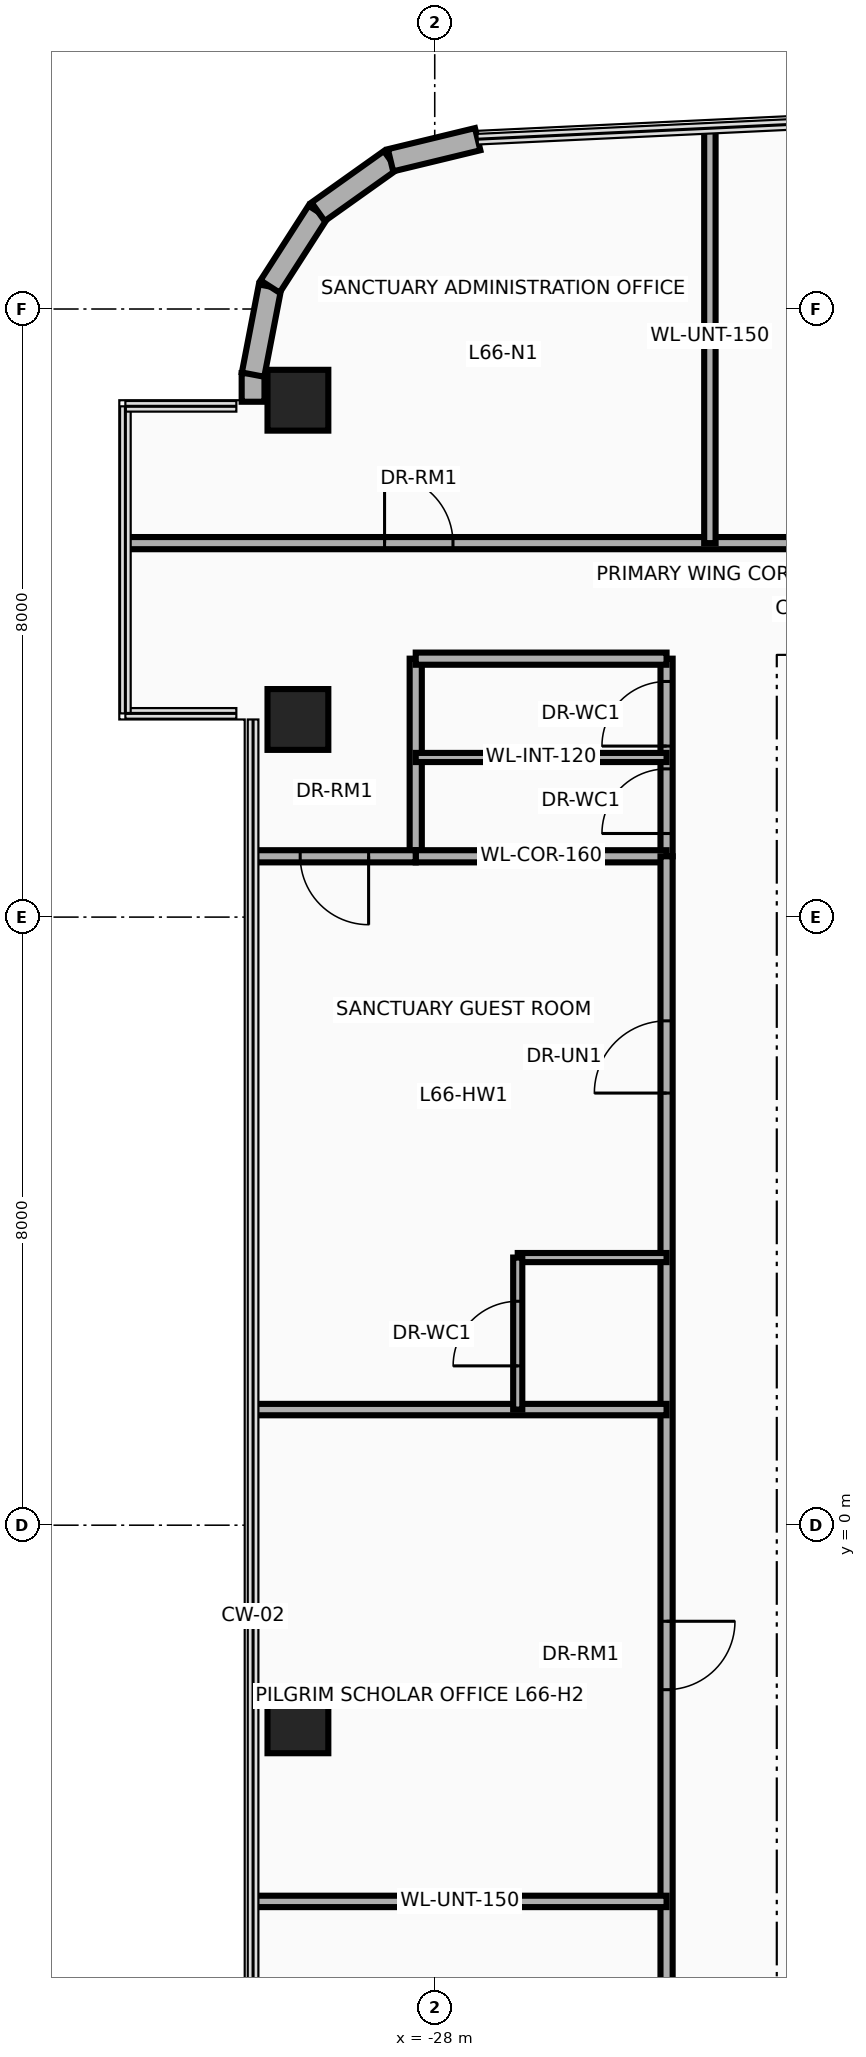
"""IFC4 building model, lengths in metres.
Left out: names, types, materials, properties, quantities, classifications, styles, units other than length and angle.
Written with IfcOpenShell. Run it as: python <this file> out.ifc"""

import sys

from ifc_helpers import new_model, si_unit, direction, frame, frame_2d, origin, origin_2d, place, context, subcontext, project, spatial, rectangle, extrude, source, transform, mapped, element, fill, save


model = new_model("IFC4")
c1 = context("Model", 3, precision=1e-05, world=origin(), true_north=direction((0.0, 1.0)))
c2 = subcontext(c1, "Body", "Model", "MODEL_VIEW")
j1 = project(units=[si_unit("LENGTHUNIT", "METRE"), si_unit("PLANEANGLEUNIT", "RADIAN")], contexts=[c1])
p1 = place(None, origin())
s1 = spatial("IfcSite", under=j1, at=p1, CompositionType="ELEMENT")
p2 = place(p1, origin())
s2 = spatial("IfcBuilding", under=s1, at=p2, CompositionType="ELEMENT")
p3 = place(p2, frame((0.0, 0.0, 254.5)))
s3 = spatial("IfcBuildingStorey", under=s2, at=p3, CompositionType="ELEMENT", Elevation=254.5)
m1 = source(origin(), c2, "Body", "SweptSolid", [
    extrude(rectangle(XDim=0.8, YDim=0.8, at=origin_2d()), origin(), (0.0, 0.0, 1.0), 3.5),
])
for number, where, z_axis, x_axis in (
    (1, (-29.8, -2.6, 0.0), (0.0, 0.0, 1.0), (1.0, 0.0, 0.0)),
    (2, (-29.8, 10.6, 0.0), (0.0, 0.0, 1.0), (1.0, 0.0, 0.0)),
    (3, (-29.8, 14.8, 0.0), (0.0, 0.0, 1.0), (1.0, 0.0, 0.0)),
):
    element("IfcColumn", number, at=place(p3, frame(where, z_axis=z_axis, x_axis=x_axis)), inside=s3, PredefinedType="COLUMN", context=c2, shape_type="MappedRepresentation", body=[
        mapped(m1, transform((0.0, 0.0, 0.0), x_axis=(1.0, 0.0, 0.0), y_axis=(0.0, 1.0, 0.0), z_axis=(0.0, 0.0, 1.0), scale=1.0)),
    ])
p4 = place(p3, frame((-30.39, 14.78, 0.0), z_axis=(0.0, 0.0, 1.0), x_axis=(0.0, 1.0, 0.0)))
e4 = element("IfcWall", 4, at=p4, inside=s3, PredefinedType="SOLIDWALL", context=c2, shape_type="SweptSolid", body=[
    extrude(rectangle(XDim=0.377, YDim=0.3, at=frame_2d((0.188, 0.0))), origin(), (0.0, 0.0, 1.0), 2.245),
])
p5 = place(p3, frame((-30.39, 15.137, 0.0), z_axis=(0.0, 0.0, 1.0), x_axis=(0.189307792679, 0.981917796779, 0.0)))
e5 = element("IfcWall", 5, at=p5, inside=s3, PredefinedType="SOLIDWALL", context=c2, shape_type="SweptSolid", body=[
    extrude(rectangle(XDim=1.18, YDim=0.3, at=frame_2d((0.59, 0.0))), origin(), (0.0, 0.0, 1.0), 2.245),
])
p6 = place(p3, frame((-30.167, 16.295, 0.0), z_axis=(0.0, 0.0, 1.0), x_axis=(0.540842020947, 0.841124193195, 0.0)))
e6 = element("IfcWall", 6, at=p6, inside=s3, PredefinedType="SOLIDWALL", context=c2, shape_type="SweptSolid", body=[
    extrude(rectangle(XDim=1.169, YDim=0.3, at=frame_2d((0.584, 0.0))), origin(), (0.0, 0.0, 1.0), 3.26),
])
p7 = place(p3, frame((-29.534, 17.279, 0.0), z_axis=(0.0, 0.0, 1.0), x_axis=(0.81466371606, 0.579933642527, 0.0)))
e7 = element("IfcWall", 7, at=p7, inside=s3, PredefinedType="SOLIDWALL", context=c2, shape_type="SweptSolid", body=[
    extrude(rectangle(XDim=1.169, YDim=0.3, at=frame_2d((0.584, 0.0))), origin(), (0.0, 0.0, 1.0), 3.26),
])
p8 = place(p3, frame((-28.582, 17.957, 0.0), z_axis=(0.0, 0.0, 1.0), x_axis=(0.971929016595, 0.235274279725, 0.0)))
e8 = element("IfcWall", 8, at=p8, inside=s3, PredefinedType="SOLIDWALL", context=c2, shape_type="SweptSolid", body=[
    extrude(rectangle(XDim=1.18, YDim=0.3, at=frame_2d((0.59, 0.0))), origin(), (0.0, 0.0, 1.0), 3.26),
])
p9 = place(p3, frame((-28.25, 8.8, 0.0), z_axis=(0.0, 0.0, 1.0), x_axis=(0.0, 1.0, 0.0)))
e9 = element("IfcWall", 9, at=p9, inside=s3, PredefinedType="PARTITIONING", context=c2, shape_type="SweptSolid", body=[
    extrude(rectangle(XDim=2.6, YDim=0.16, at=frame_2d((1.3, 0.0))), origin(), (0.0, 0.0, 1.0), 2.544),
])
p10 = place(p3, frame((-24.95, 8.8, 0.0), z_axis=(0.0, 0.0, 1.0), x_axis=(0.0, 1.0, 0.0)))
e10 = element("IfcWall", 10, at=p10, inside=s3, PredefinedType="PARTITIONING", context=c2, shape_type="SweptSolid", body=[
    extrude(rectangle(XDim=2.6, YDim=0.16, at=frame_2d((1.3, 0.0))), origin(), (0.0, 0.0, 1.0), 2.544),
])
p11 = place(p10, frame((0.3, 0.0, 0.0)))
e11 = element("IfcOpeningElement", 11, at=p11, cuts=e10, PredefinedType="OPENING", context=c2, shape_type="SweptSolid", body=[
    extrude(rectangle(XDim=0.85, YDim=2.1, at=frame_2d((0.425, 1.05))), frame((0.0, 0.095, 0.0), z_axis=(0.0, -1.0, 0.0), x_axis=(1.0, 0.0, 0.0)), (0.0, 0.0, 1.0), 0.19),
])
p12 = place(p10, frame((1.45, 0.0, 0.0)))
e12 = element("IfcOpeningElement", 12, at=p12, cuts=e10, PredefinedType="OPENING", context=c2, shape_type="SweptSolid", body=[
    extrude(rectangle(XDim=0.85, YDim=2.1, at=frame_2d((0.425, 1.05))), frame((0.0, 0.095, 0.0), z_axis=(0.0, -1.0, 0.0), x_axis=(1.0, 0.0, 0.0)), (0.0, 0.0, 1.0), 0.19),
])
for number, where, z_axis, x_axis in (
    (13, (-28.25, 8.8, 0.0), (0.0, 0.0, 1.0), (1.0, 0.0, 0.0)),
    (14, (-28.25, 11.4, 0.0), (0.0, 0.0, 1.0), (1.0, 0.0, 0.0)),
):
    element("IfcWall", number, at=place(p3, frame(where, z_axis=z_axis, x_axis=x_axis)), inside=s3, PredefinedType="PARTITIONING", context=c2, shape_type="SweptSolid", body=[
        extrude(rectangle(XDim=3.3, YDim=0.16, at=frame_2d((1.65, 0.0))), origin(), (0.0, 0.0, 1.0), 3.26),
    ])
p13 = place(p3, frame((-28.25, 10.1, 0.0), z_axis=(0.0, 0.0, 1.0), x_axis=(1.0, 0.0, 0.0)))
e15 = element("IfcWall", 15, at=p13, inside=s3, PredefinedType="PARTITIONING", context=c2, shape_type="SweptSolid", body=[
    extrude(rectangle(XDim=3.3, YDim=0.12, at=frame_2d((1.65, 0.0))), origin(), (0.0, 0.0, 1.0), 3.26),
])
p14 = place(p3, frame((-24.95, -11.42, 0.0), z_axis=(0.0, 0.0, 1.0), x_axis=(0.0, 1.0, 0.0)))
e16 = element("IfcWall", 16, at=p14, inside=s3, PredefinedType="PARTITIONING", context=c2, shape_type="SweptSolid", body=[
    extrude(rectangle(XDim=20.22, YDim=0.16, at=frame_2d((10.11, 0.0))), origin(), (0.0, 0.0, 1.0), 2.544),
])
p15 = place(p14, frame((2.785, 0.0, 0.0)))
e17 = element("IfcOpeningElement", 17, at=p15, cuts=e16, PredefinedType="OPENING", context=c2, shape_type="SweptSolid", body=[
    extrude(rectangle(XDim=0.9, YDim=2.1, at=frame_2d((0.45, 1.05))), frame((0.0, 0.095, 0.0), z_axis=(0.0, -1.0, 0.0), x_axis=(1.0, 0.0, 0.0)), (0.0, 0.0, 1.0), 0.19),
])
p16 = place(p14, frame((9.256, 0.0, 0.0)))
e18 = element("IfcOpeningElement", 18, at=p16, cuts=e16, PredefinedType="OPENING", context=c2, shape_type="SweptSolid", body=[
    extrude(rectangle(XDim=0.9, YDim=2.1, at=frame_2d((0.45, 1.05))), frame((0.0, 0.095, 0.0), z_axis=(0.0, -1.0, 0.0), x_axis=(1.0, 0.0, 0.0)), (0.0, 0.0, 1.0), 0.19),
])
p17 = place(p14, frame((17.105, 0.0, 0.0)))
e19 = element("IfcOpeningElement", 19, at=p17, cuts=e16, PredefinedType="OPENING", context=c2, shape_type="SweptSolid", body=[
    extrude(rectangle(XDim=0.95, YDim=2.15, at=frame_2d((0.475, 1.075))), frame((0.0, 0.095, 0.0), z_axis=(0.0, -1.0, 0.0), x_axis=(1.0, 0.0, 0.0)), (0.0, 0.0, 1.0), 0.19),
])
p18 = place(p3, frame((-30.39, 8.8, 0.0), z_axis=(0.0, 0.0, 1.0), x_axis=(1.0, 0.0, 0.0)))
e20 = element("IfcWall", 20, at=p18, inside=s3, PredefinedType="PARTITIONING", context=c2, shape_type="SweptSolid", body=[
    extrude(rectangle(XDim=2.14, YDim=0.16, at=frame_2d((1.07, 0.0))), origin(), (0.0, 0.0, 1.0), 2.706),
])
p19 = place(p18, frame((0.62, 0.0, 0.0)))
e21 = element("IfcOpeningElement", 21, at=p19, cuts=e20, PredefinedType="OPENING", context=c2, shape_type="SweptSolid", body=[
    extrude(rectangle(XDim=0.9, YDim=2.1, at=frame_2d((0.45, 1.05))), frame((0.0, 0.095, 0.0), z_axis=(0.0, -1.0, 0.0), x_axis=(1.0, 0.0, 0.0)), (0.0, 0.0, 1.0), 0.19),
])
for number, where, z_axis, x_axis in (
    (22, (-30.39, 1.521, 0.0), (0.0, 0.0, 1.0), (1.0, 0.0, 0.0)),
    (23, (-30.39, -4.949, 0.0), (0.0, 0.0, 1.0), (1.0, 0.0, 0.0)),
):
    element("IfcWall", number, at=place(p3, frame(where, z_axis=z_axis, x_axis=x_axis)), inside=s3, PredefinedType="PARTITIONING", context=c2, shape_type="SweptSolid", body=[
        extrude(rectangle(XDim=5.44, YDim=0.15, at=frame_2d((2.72, 0.0))), origin(), (0.0, 0.0, 1.0), 2.706),
    ])
p20 = place(p3, frame((-26.908, 3.521, 0.0), z_axis=(0.0, 0.0, 1.0), x_axis=(1.0, 0.0, 0.0)))
e24 = element("IfcWall", 24, at=p20, inside=s3, PredefinedType="PARTITIONING", context=c2, shape_type="SweptSolid", body=[
    extrude(rectangle(XDim=1.958, YDim=0.12, at=frame_2d((0.979, 0.0))), origin(), (0.0, 0.0, 1.0), 2.839),
])
p21 = place(p3, frame((-26.908, 1.521, 0.0), z_axis=(0.0, 0.0, 1.0), x_axis=(0.0, 1.0, 0.0)))
e25 = element("IfcWall", 25, at=p21, inside=s3, PredefinedType="PARTITIONING", context=c2, shape_type="SweptSolid", body=[
    extrude(rectangle(XDim=2.0, YDim=0.12, at=frame_2d((1.0, 0.0))), origin(), (0.0, 0.0, 1.0), 2.839),
])
p22 = place(p21, frame((0.575, 0.0, 0.0)))
e26 = element("IfcOpeningElement", 26, at=p22, cuts=e25, PredefinedType="OPENING", context=c2, shape_type="SweptSolid", body=[
    extrude(rectangle(XDim=0.85, YDim=2.1, at=frame_2d((0.425, 1.05))), frame((0.0, 0.075, 0.0), z_axis=(0.0, -1.0, 0.0), x_axis=(1.0, 0.0, 0.0)), (0.0, 0.0, 1.0), 0.15),
])
p23 = place(p3, frame((-32.04, 12.92, 0.0), z_axis=(0.0, 0.0, 1.0), x_axis=(1.0, 0.0, 0.0)))
e27 = element("IfcWall", 27, at=p23, inside=s3, PredefinedType="PARTITIONING", context=c2, shape_type="SweptSolid", body=[
    extrude(rectangle(XDim=31.13, YDim=0.16, at=frame_2d((15.565, 0.0))), origin(), (0.0, 0.0, 1.0), 2.634),
])
p24 = place(p23, frame((3.38, 0.0, 0.0)))
e28 = element("IfcOpeningElement", 28, at=p24, cuts=e27, PredefinedType="OPENING", context=c2, shape_type="SweptSolid", body=[
    extrude(rectangle(XDim=0.9, YDim=2.1, at=frame_2d((0.45, 1.05))), frame((0.0, 0.095, 0.0), z_axis=(0.0, -1.0, 0.0), x_axis=(1.0, 0.0, 0.0)), (0.0, 0.0, 1.0), 0.19),
])
p25 = place(p23, frame((11.14, 0.0, 0.0)))
e29 = element("IfcOpeningElement", 29, at=p25, cuts=e27, PredefinedType="OPENING", context=c2, shape_type="SweptSolid", body=[
    extrude(rectangle(XDim=0.9, YDim=2.1, at=frame_2d((0.45, 1.05))), frame((0.0, 0.095, 0.0), z_axis=(0.0, -1.0, 0.0), x_axis=(1.0, 0.0, 0.0)), (0.0, 0.0, 1.0), 0.19),
])
p26 = place(p23, frame((19.0, 0.0, 0.0)))
e30 = element("IfcOpeningElement", 30, at=p26, cuts=e27, PredefinedType="OPENING", context=c2, shape_type="SweptSolid", body=[
    extrude(rectangle(XDim=0.9, YDim=2.1, at=frame_2d((0.45, 1.05))), frame((0.0, 0.095, 0.0), z_axis=(0.0, -1.0, 0.0), x_axis=(1.0, 0.0, 0.0)), (0.0, 0.0, 1.0), 0.19),
])
p27 = place(p23, frame((26.805, 0.0, 0.0)))
e31 = element("IfcOpeningElement", 31, at=p27, cuts=e27, PredefinedType="OPENING", context=c2, shape_type="SweptSolid", body=[
    extrude(rectangle(XDim=0.9, YDim=2.1, at=frame_2d((0.45, 1.05))), frame((0.0, 0.095, 0.0), z_axis=(0.0, -1.0, 0.0), x_axis=(1.0, 0.0, 0.0)), (0.0, 0.0, 1.0), 0.19),
])
p28 = place(p3, frame((-24.38, 12.92, 0.0), z_axis=(0.0, 0.0, 1.0), x_axis=(0.0, 1.0, 0.0)))
e32 = element("IfcWall", 32, at=p28, inside=s3, PredefinedType="PARTITIONING", context=c2, shape_type="SweptSolid", body=[
    extrude(rectangle(XDim=5.458, YDim=0.15, at=frame_2d((2.729, 0.0))), origin(), (0.0, 0.0, 1.0), 2.544),
])
p29 = place(p11, origin())
e33 = element("IfcDoor", 33, at=p29, inside=s3, OperationType="SINGLE_SWING_LEFT", PredefinedType="DOOR", context=c2, shape_type="SweptSolid", body=[
    extrude(rectangle(XDim=0.85, YDim=2.1, at=frame_2d((0.425, 1.05))), frame((0.0, 0.025, 0.0), z_axis=(0.0, -1.0, 0.0), x_axis=(1.0, 0.0, 0.0)), (0.0, 0.0, 1.0), 0.05),
])
fill(e11, e33)
p30 = place(p12, origin())
e34 = element("IfcDoor", 34, at=p30, inside=s3, OperationType="SINGLE_SWING_RIGHT", PredefinedType="DOOR", context=c2, shape_type="SweptSolid", body=[
    extrude(rectangle(XDim=0.85, YDim=2.1, at=frame_2d((0.425, 1.05))), frame((0.0, 0.025, 0.0), z_axis=(0.0, -1.0, 0.0), x_axis=(1.0, 0.0, 0.0)), (0.0, 0.0, 1.0), 0.05),
])
fill(e12, e34)
p31 = place(p19, frame((0.9, 0.0, 0.0), z_axis=(0.0, 0.0, 1.0), x_axis=(-1.0, 0.0, 0.0)))
e35 = element("IfcDoor", 35, at=p31, inside=s3, OperationType="SINGLE_SWING_LEFT", PredefinedType="DOOR", context=c2, shape_type="SweptSolid", body=[
    extrude(rectangle(XDim=0.9, YDim=2.1, at=frame_2d((0.45, 1.05))), frame((0.0, 0.025, 0.0), z_axis=(0.0, -1.0, 0.0), x_axis=(1.0, 0.0, 0.0)), (0.0, 0.0, 1.0), 0.05),
])
fill(e21, e35)
p32 = place(p16, frame((0.9, 0.0, 0.0), z_axis=(0.0, 0.0, 1.0), x_axis=(-1.0, 0.0, 0.0)))
e36 = element("IfcDoor", 36, at=p32, inside=s3, OperationType="SINGLE_SWING_LEFT", PredefinedType="DOOR", context=c2, shape_type="SweptSolid", body=[
    extrude(rectangle(XDim=0.9, YDim=2.1, at=frame_2d((0.45, 1.05))), frame((0.0, 0.025, 0.0), z_axis=(0.0, -1.0, 0.0), x_axis=(1.0, 0.0, 0.0)), (0.0, 0.0, 1.0), 0.05),
])
fill(e18, e36)
p33 = place(p17, origin())
e37 = element("IfcDoor", 37, at=p33, inside=s3, OperationType="SINGLE_SWING_RIGHT", PredefinedType="DOOR", context=c2, shape_type="SweptSolid", body=[
    extrude(rectangle(XDim=0.95, YDim=2.15, at=frame_2d((0.475, 1.075))), frame((0.0, 0.025, 0.0), z_axis=(0.0, -1.0, 0.0), x_axis=(1.0, 0.0, 0.0)), (0.0, 0.0, 1.0), 0.05),
])
fill(e19, e37)
p34 = place(p22, origin())
e38 = element("IfcDoor", 38, at=p34, inside=s3, OperationType="SINGLE_SWING_LEFT", PredefinedType="DOOR", context=c2, shape_type="SweptSolid", body=[
    extrude(rectangle(XDim=0.85, YDim=2.1, at=frame_2d((0.425, 1.05))), frame((0.0, 0.025, 0.0), z_axis=(0.0, -1.0, 0.0), x_axis=(1.0, 0.0, 0.0)), (0.0, 0.0, 1.0), 0.05),
])
fill(e26, e38)
p35 = place(p24, origin())
e39 = element("IfcDoor", 39, at=p35, inside=s3, OperationType="SINGLE_SWING_RIGHT", PredefinedType="DOOR", context=c2, shape_type="SweptSolid", body=[
    extrude(rectangle(XDim=0.9, YDim=2.1, at=frame_2d((0.45, 1.05))), frame((0.0, 0.025, 0.0), z_axis=(0.0, -1.0, 0.0), x_axis=(1.0, 0.0, 0.0)), (0.0, 0.0, 1.0), 0.05),
])
fill(e28, e39)
save(model, sys.argv[1])
